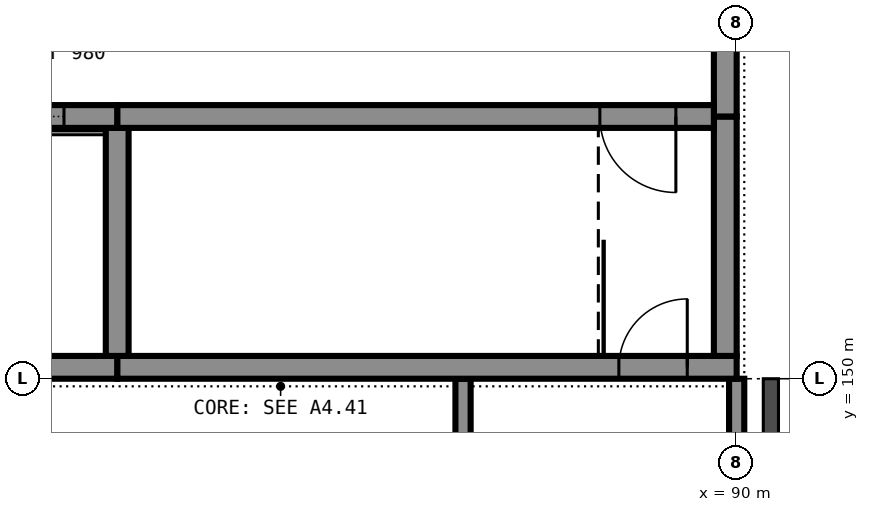
"""IFC4 building model, lengths in metres.
Left out: names, types, materials, properties, quantities, classifications, styles, units other than length and angle.
Written with IfcOpenShell. Run it as: python <this file> out.ifc"""

import sys

from ifc_helpers import new_model, si_unit, direction, frame, frame_2d, origin, place, context, subcontext, project, spatial, rectangle, extrude, element, fill, save


model = new_model("IFC4")
c1 = context("Model", 3, precision=1e-05, world=origin(), true_north=direction((0.0, 1.0)))
c2 = subcontext(c1, "Body", "Model", "MODEL_VIEW")
j1 = project(units=[si_unit("LENGTHUNIT", "METRE"), si_unit("PLANEANGLEUNIT", "RADIAN")], contexts=[c1])
p1 = place(None, origin())
s1 = spatial("IfcSite", under=j1, at=p1, CompositionType="ELEMENT")
p2 = place(p1, origin())
s2 = spatial("IfcBuilding", under=s1, at=p2, CompositionType="ELEMENT")
p3 = place(p2, frame((0.0, 0.0, 12.0)))
s3 = spatial("IfcBuildingStorey", under=s2, at=p3, CompositionType="ELEMENT", Elevation=12.0)
p4 = place(p3, frame((90.0, 150.15, 0.0), z_axis=(0.0, 0.0, 1.0), x_axis=(-1.0, 0.0, 0.0)))
e1 = element("IfcWall", 1, at=p4, inside=s3, PredefinedType="SHEAR", context=c2, shape_type="SweptSolid", body=[
    extrude(rectangle(XDim=8.15, YDim=0.3, at=frame_2d((4.075, 0.0))), origin(), (0.0, 0.0, 1.0), 5.0),
])
p5 = place(p4, frame((0.65, 0.0, 0.0)))
e2 = element("IfcOpeningElement", 2, at=p5, cuts=e1, PredefinedType="OPENING", context=c2, shape_type="SweptSolid", body=[
    extrude(rectangle(XDim=0.9, YDim=2.1, at=frame_2d((0.45, 1.05))), frame((0.0, 0.16, 0.0), z_axis=(0.0, -1.0, 0.0), x_axis=(1.0, 0.0, 0.0)), (0.0, 0.0, 1.0), 0.32),
])
p6 = place(p3, frame((81.85, 150.15, 0.0), z_axis=(0.0, 0.0, 1.0), x_axis=(-1.0, 0.0, 0.0)))
e3 = element("IfcWall", 3, at=p6, inside=s3, PredefinedType="SHEAR", context=c2, shape_type="SweptSolid", body=[
    extrude(rectangle(XDim=2.5, YDim=0.3, at=frame_2d((1.25, 0.0))), origin(), (0.0, 0.0, 1.0), 5.0),
])
p7 = place(p3, frame((89.7, 153.45, 0.0), z_axis=(0.0, 0.0, 1.0), x_axis=(-1.0, 0.0, 0.0)))
e4 = element("IfcWall", 4, at=p7, inside=s3, PredefinedType="SHEAR", context=c2, shape_type="SweptSolid", body=[
    extrude(rectangle(XDim=7.85, YDim=0.3, at=frame_2d((3.925, 0.0))), origin(), (0.0, 0.0, 1.0), 5.0),
])
p8 = place(p7, frame((0.5, 0.0, 0.0)))
e5 = element("IfcOpeningElement", 5, at=p8, cuts=e4, PredefinedType="OPENING", context=c2, shape_type="SweptSolid", body=[
    extrude(rectangle(XDim=1.0, YDim=2.1, at=frame_2d((0.5, 1.05))), frame((0.0, 0.16, 0.0), z_axis=(0.0, -1.0, 0.0), x_axis=(1.0, 0.0, 0.0)), (0.0, 0.0, 1.0), 0.32),
])
p9 = place(p3, frame((81.85, 153.45, 0.0), z_axis=(0.0, 0.0, 1.0), x_axis=(-1.0, 0.0, 0.0)))
e6 = element("IfcWall", 6, at=p9, inside=s3, PredefinedType="SHEAR", context=c2, shape_type="SweptSolid", body=[
    extrude(rectangle(XDim=2.5, YDim=0.3, at=frame_2d((1.25, 0.0))), origin(), (0.0, 0.0, 1.0), 5.0),
])
p10 = place(p9, frame((0.7, 0.0, 0.0)))
e7 = element("IfcOpeningElement", 7, at=p10, cuts=e6, PredefinedType="OPENING", context=c2, shape_type="SweptSolid", body=[
    extrude(rectangle(XDim=1.1, YDim=2.1, at=frame_2d((0.55, 1.05))), frame((0.0, 0.16, 0.0), z_axis=(0.0, -1.0, 0.0), x_axis=(1.0, 0.0, 0.0)), (0.0, 0.0, 1.0), 0.32),
])
p11 = place(p3, frame((89.85, 150.3, 0.0), z_axis=(0.0, 0.0, 1.0), x_axis=(0.0, 1.0, 0.0)))
e8 = element("IfcWall", 8, at=p11, inside=s3, PredefinedType="SHEAR", context=c2, shape_type="SweptSolid", body=[
    extrude(rectangle(XDim=3.15, YDim=0.3, at=frame_2d((1.575, 0.0))), origin(), (0.0, 0.0, 1.0), 5.0),
])
p12 = place(p3, frame((89.85, 153.45, 0.0), z_axis=(0.0, 0.0, 1.0), x_axis=(0.0, 1.0, 0.0)))
e9 = element("IfcWall", 9, at=p12, inside=s3, PredefinedType="SHEAR", context=c2, shape_type="SweptSolid", body=[
    extrude(rectangle(XDim=5.1, YDim=0.3, at=frame_2d((2.55, 0.0))), origin(), (0.0, 0.0, 1.0), 5.0),
])
p13 = place(p3, frame((81.85, 150.3, 0.0), z_axis=(0.0, 0.0, 1.0), x_axis=(0.0, 1.0, 0.0)))
e10 = element("IfcWall", 10, at=p13, inside=s3, PredefinedType="SHEAR", context=c2, shape_type="SweptSolid", body=[
    extrude(rectangle(XDim=3.0, YDim=0.3, at=frame_2d((1.5, 0.0))), origin(), (0.0, 0.0, 1.0), 5.0),
])
p14 = place(p3, frame((86.4, 114.0, 0.0), z_axis=(0.0, 0.0, 1.0), x_axis=(0.0, 1.0, 0.0)))
e11 = element("IfcWall", 11, at=p14, inside=s3, PredefinedType="PARTITIONING", context=c2, shape_type="SweptSolid", body=[
    extrude(rectangle(XDim=36.0, YDim=0.2, at=frame_2d((18.0, 0.0))), origin(), (0.0, 0.0, 1.0), 4.825),
])
p15 = place(p14, frame((2.5, 0.0, 0.0)))
e12 = element("IfcOpeningElement", 12, at=p15, cuts=e11, PredefinedType="OPENING", context=c2, shape_type="SweptSolid", body=[
    extrude(rectangle(XDim=1.0, YDim=2.1, at=frame_2d((0.5, 1.05))), frame((0.0, 0.11, 0.0), z_axis=(0.0, -1.0, 0.0), x_axis=(1.0, 0.0, 0.0)), (0.0, 0.0, 1.0), 0.22),
])
p16 = place(p14, frame((8.5, 0.0, 0.0)))
e13 = element("IfcOpeningElement", 13, at=p16, cuts=e11, PredefinedType="OPENING", context=c2, shape_type="SweptSolid", body=[
    extrude(rectangle(XDim=1.0, YDim=2.1, at=frame_2d((0.5, 1.05))), frame((0.0, 0.11, 0.0), z_axis=(0.0, -1.0, 0.0), x_axis=(1.0, 0.0, 0.0)), (0.0, 0.0, 1.0), 0.22),
])
p17 = place(p14, frame((14.5, 0.0, 0.0)))
e14 = element("IfcOpeningElement", 14, at=p17, cuts=e11, PredefinedType="OPENING", context=c2, shape_type="SweptSolid", body=[
    extrude(rectangle(XDim=1.0, YDim=2.1, at=frame_2d((0.5, 1.05))), frame((0.0, 0.11, 0.0), z_axis=(0.0, -1.0, 0.0), x_axis=(1.0, 0.0, 0.0)), (0.0, 0.0, 1.0), 0.22),
])
p18 = place(p14, frame((20.5, 0.0, 0.0)))
e15 = element("IfcOpeningElement", 15, at=p18, cuts=e11, PredefinedType="OPENING", context=c2, shape_type="SweptSolid", body=[
    extrude(rectangle(XDim=1.0, YDim=2.1, at=frame_2d((0.5, 1.05))), frame((0.0, 0.11, 0.0), z_axis=(0.0, -1.0, 0.0), x_axis=(1.0, 0.0, 0.0)), (0.0, 0.0, 1.0), 0.22),
])
p19 = place(p14, frame((26.5, 0.0, 0.0)))
e16 = element("IfcOpeningElement", 16, at=p19, cuts=e11, PredefinedType="OPENING", context=c2, shape_type="SweptSolid", body=[
    extrude(rectangle(XDim=1.0, YDim=2.1, at=frame_2d((0.5, 1.05))), frame((0.0, 0.11, 0.0), z_axis=(0.0, -1.0, 0.0), x_axis=(1.0, 0.0, 0.0)), (0.0, 0.0, 1.0), 0.22),
])
p20 = place(p14, frame((32.5, 0.0, 0.0)))
e17 = element("IfcOpeningElement", 17, at=p20, cuts=e11, PredefinedType="OPENING", context=c2, shape_type="SweptSolid", body=[
    extrude(rectangle(XDim=1.0, YDim=2.1, at=frame_2d((0.5, 1.05))), frame((0.0, 0.11, 0.0), z_axis=(0.0, -1.0, 0.0), x_axis=(1.0, 0.0, 0.0)), (0.0, 0.0, 1.0), 0.22),
])
p21 = place(p3, frame((90.0, 114.0, 0.0), z_axis=(0.0, 0.0, 1.0), x_axis=(0.0, 1.0, 0.0)))
e18 = element("IfcWall", 18, at=p21, inside=s3, PredefinedType="PARTITIONING", context=c2, shape_type="SweptSolid", body=[
    extrude(rectangle(XDim=36.0, YDim=0.2, at=frame_2d((18.0, 0.0))), origin(), (0.0, 0.0, 1.0), 4.825),
])
p22 = place(p5, frame((0.9, 0.0, 0.0), z_axis=(0.0, 0.0, 1.0), x_axis=(-1.0, 0.0, 0.0)))
e19 = element("IfcDoor", 19, at=p22, inside=s3, OperationType="SINGLE_SWING_LEFT", PredefinedType="DOOR", context=c2, shape_type="SweptSolid", body=[
    extrude(rectangle(XDim=0.9, YDim=2.1, at=frame_2d((0.45, 1.05))), frame((0.0, 0.025, 0.0), z_axis=(0.0, -1.0, 0.0), x_axis=(1.0, 0.0, 0.0)), (0.0, 0.0, 1.0), 0.05),
])
fill(e2, e19)
p23 = place(p10, origin())
e20 = element("IfcDoor", 20, at=p23, inside=s3, OperationType="SLIDING_TO_LEFT", PredefinedType="DOOR", context=c2, shape_type="SweptSolid", body=[
    extrude(rectangle(XDim=1.1, YDim=2.1, at=frame_2d((0.55, 1.05))), frame((0.0, 0.025, 0.0), z_axis=(0.0, -1.0, 0.0), x_axis=(1.0, 0.0, 0.0)), (0.0, 0.0, 1.0), 0.05),
])
fill(e7, e20)
p24 = place(p8, origin())
e21 = element("IfcDoor", 21, at=p24, inside=s3, OperationType="SINGLE_SWING_RIGHT", PredefinedType="DOOR", context=c2, shape_type="SweptSolid", body=[
    extrude(rectangle(XDim=1.0, YDim=2.1, at=frame_2d((0.5, 1.05))), frame((0.0, 0.025, 0.0), z_axis=(0.0, -1.0, 0.0), x_axis=(1.0, 0.0, 0.0)), (0.0, 0.0, 1.0), 0.05),
])
fill(e5, e21)
save(model, sys.argv[1])
